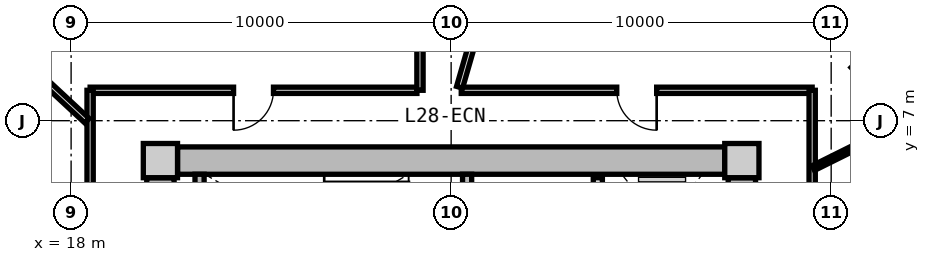
"""IFC4 building model, lengths in metres.
Left out: names, types, materials, properties, quantities, classifications, styles, units other than length and angle.
Written with IfcOpenShell. Run it as: python <this file> out.ifc"""

import sys

from ifc_helpers import new_model, si_unit, direction, frame, frame_2d, origin, origin_2d, place, context, subcontext, project, spatial, rectangle, extrude, source, transform, mapped, element, fill, save


model = new_model("IFC4")
c1 = context("Model", 3, precision=1e-05, world=origin(), true_north=direction((0.0, 1.0)))
c2 = subcontext(c1, "Body", "Model", "MODEL_VIEW")
j1 = project(units=[si_unit("LENGTHUNIT", "METRE"), si_unit("PLANEANGLEUNIT", "RADIAN")], contexts=[c1])
p1 = place(None, origin())
s1 = spatial("IfcSite", under=j1, at=p1, CompositionType="ELEMENT")
p2 = place(p1, origin())
s2 = spatial("IfcBuilding", under=s1, at=p2, CompositionType="ELEMENT")
p3 = place(p2, frame((0.0, 0.0, 93.2)))
s3 = spatial("IfcBuildingStorey", under=s2, at=p3, CompositionType="ELEMENT", Elevation=93.2)
m1 = source(origin(), c2, "Body", "SweptSolid", [
    extrude(rectangle(XDim=0.9, YDim=0.9, at=origin_2d()), origin(), (0.0, 0.0, 1.0), 3.05),
])
for number, where, z_axis, x_axis in (
    (1, (35.65, 5.95, 0.0), (0.0, 0.0, 1.0), (1.0, 0.0, 0.0)),
    (2, (20.35, 5.95, 0.0), (0.0, 0.0, 1.0), (1.0, 0.0, 0.0)),
):
    element("IfcColumn", number, at=place(p3, frame(where, z_axis=z_axis, x_axis=x_axis)), inside=s3, PredefinedType="COLUMN", context=c2, shape_type="MappedRepresentation", body=[
        mapped(m1, transform((0.0, 0.0, 0.0), x_axis=(1.0, 0.0, 0.0), y_axis=(0.0, 1.0, 0.0), z_axis=(0.0, 0.0, 1.0), scale=1.0)),
    ])
m2 = source(origin(), c2, "Body", "SweptSolid", [
    extrude(rectangle(XDim=14.4, YDim=0.72, at=frame_2d((7.2, 0.0))), origin(), (0.0, 0.0, 1.0), 2.79),
])
p4 = place(p3, frame((20.8, 5.95, 0.0), z_axis=(0.0, 0.0, 1.0), x_axis=(1.0, 0.0, 0.0)))
e3 = element("IfcWall", 3, at=p4, inside=s3, PredefinedType="SHEAR", context=c2, shape_type="MappedRepresentation", body=[
    mapped(m2, transform((0.0, 0.0, 0.0), x_axis=(1.0, 0.0, 0.0), y_axis=(0.0, 1.0, 0.0), z_axis=(0.0, 0.0, 1.0), scale=1.0)),
])
m3 = source(origin(), c2, "Body", "SweptSolid", [
    extrude(rectangle(XDim=11.0, YDim=0.72, at=frame_2d((5.5, 0.0))), origin(), (0.0, 0.0, 1.0), 2.79),
])
p5 = place(p3, frame((20.35, -5.5, 0.0), z_axis=(0.0, 0.0, 1.0), x_axis=(0.0, 1.0, 0.0)))
e4 = element("IfcWall", 4, at=p5, inside=s3, PredefinedType="SHEAR", context=c2, shape_type="MappedRepresentation", body=[
    mapped(m3, transform((0.0, 0.0, 0.0), x_axis=(1.0, 0.0, 0.0), y_axis=(0.0, 1.0, 0.0), z_axis=(0.0, 0.0, 1.0), scale=1.0)),
])
p6 = place(p5, frame((3.8, 0.0, 0.0)))
e5 = element("IfcOpeningElement", 5, at=p6, cuts=e4, PredefinedType="OPENING", context=c2, shape_type="SweptSolid", body=[
    extrude(rectangle(XDim=1.2, YDim=2.15, at=frame_2d((0.6, 1.075))), frame((0.0, 0.37, 0.0), z_axis=(0.0, -1.0, 0.0), x_axis=(1.0, 0.0, 0.0)), (0.0, 0.0, 1.0), 0.74),
])
p7 = place(p3, frame((35.65, 5.5, 0.0), z_axis=(0.0, 0.0, 1.0), x_axis=(0.0, -1.0, 0.0)))
e6 = element("IfcWall", 6, at=p7, inside=s3, PredefinedType="SHEAR", context=c2, shape_type="MappedRepresentation", body=[
    mapped(m3, transform((0.0, 0.0, 0.0), x_axis=(1.0, 0.0, 0.0), y_axis=(0.0, 1.0, 0.0), z_axis=(0.0, 0.0, 1.0), scale=1.0)),
])
p8 = place(p7, frame((5.65, 0.0, 0.0)))
e7 = element("IfcOpeningElement", 7, at=p8, cuts=e6, PredefinedType="OPENING", context=c2, shape_type="SweptSolid", body=[
    extrude(rectangle(XDim=1.2, YDim=2.15, at=frame_2d((0.6, 1.075))), frame((0.0, 0.37, 0.0), z_axis=(0.0, -1.0, 0.0), x_axis=(1.0, 0.0, 0.0)), (0.0, 0.0, 1.0), 0.74),
])
p9 = place(p7, frame((9.3, 0.0, 0.0)))
e8 = element("IfcOpeningElement", 8, at=p9, cuts=e6, PredefinedType="OPENING", context=c2, shape_type="SweptSolid", body=[
    extrude(rectangle(XDim=1.0, YDim=2.1, at=frame_2d((0.5, 1.05))), frame((0.0, 0.37, 0.0), z_axis=(0.0, -1.0, 0.0), x_axis=(1.0, 0.0, 0.0)), (0.0, 0.0, 1.0), 0.74),
])
m4 = source(origin(), c2, "Body", "SweptSolid", [
    extrude(rectangle(XDim=3.14, YDim=0.24, at=frame_2d((1.57, 0.0))), origin(), (0.0, 0.0, 1.0), 2.79),
])
p10 = place(p3, frame((21.38, 2.45, 0.0), z_axis=(0.0, 0.0, 1.0), x_axis=(0.0, 1.0, 0.0)))
e9 = element("IfcWall", 9, at=p10, inside=s3, PredefinedType="PARTITIONING", context=c2, shape_type="MappedRepresentation", body=[
    mapped(m4, transform((0.0, 0.0, 0.0), x_axis=(1.0, 0.0, 0.0), y_axis=(0.0, 1.0, 0.0), z_axis=(0.0, 0.0, 1.0), scale=1.0)),
])
p11 = place(p3, frame((28.42, 2.45, 0.0), z_axis=(0.0, 0.0, 1.0), x_axis=(0.0, 1.0, 0.0)))
e10 = element("IfcWall", 10, at=p11, inside=s3, PredefinedType="PARTITIONING", context=c2, shape_type="MappedRepresentation", body=[
    mapped(m4, transform((0.0, 0.0, 0.0), x_axis=(1.0, 0.0, 0.0), y_axis=(0.0, 1.0, 0.0), z_axis=(0.0, 0.0, 1.0), scale=1.0)),
])
p12 = place(p11, frame((0.55, 0.0, 0.0)))
e11 = element("IfcOpeningElement", 11, at=p12, cuts=e10, PredefinedType="OPENING", context=c2, shape_type="SweptSolid", body=[
    extrude(rectangle(XDim=1.1, YDim=2.15, at=frame_2d((0.55, 1.075))), frame((0.0, 0.13, 0.0), z_axis=(0.0, -1.0, 0.0), x_axis=(1.0, 0.0, 0.0)), (0.0, 0.0, 1.0), 0.26),
])
m5 = source(origin(), c2, "Body", "SweptSolid", [
    extrude(rectangle(XDim=5.0, YDim=0.24, at=frame_2d((2.5, 0.0))), origin(), (0.0, 0.0, 1.0), 2.775),
])
p13 = place(p3, frame((31.86, 0.5, 0.0), z_axis=(0.0, 0.0, 1.0), x_axis=(0.0, 1.0, 0.0)))
e12 = element("IfcWall", 12, at=p13, inside=s3, PredefinedType="PARTITIONING", context=c2, shape_type="MappedRepresentation", body=[
    mapped(m5, transform((0.0, 0.0, 0.0), x_axis=(1.0, 0.0, 0.0), y_axis=(0.0, 1.0, 0.0), z_axis=(0.0, 0.0, 1.0), scale=1.0)),
])
p14 = place(p13, frame((3.05, 0.0, 0.0)))
e13 = element("IfcOpeningElement", 13, at=p14, cuts=e12, PredefinedType="OPENING", context=c2, shape_type="SweptSolid", body=[
    extrude(rectangle(XDim=1.3, YDim=2.2, at=frame_2d((0.65, 1.1))), frame((0.0, 0.13, 0.0), z_axis=(0.0, -1.0, 0.0), x_axis=(1.0, 0.0, 0.0)), (0.0, 0.0, 1.0), 0.26),
])
p15 = place(p13, frame((0.55, 0.0, 0.0)))
e14 = element("IfcOpeningElement", 14, at=p15, cuts=e12, PredefinedType="OPENING", context=c2, shape_type="SweptSolid", body=[
    extrude(rectangle(XDim=1.3, YDim=2.2, at=frame_2d((0.65, 1.1))), frame((0.0, 0.13, 0.0), z_axis=(0.0, -1.0, 0.0), x_axis=(1.0, 0.0, 0.0)), (0.0, 0.0, 1.0), 0.26),
])
m6 = source(origin(), c2, "Body", "SweptSolid", [
    extrude(rectangle(XDim=8.6, YDim=0.165, at=frame_2d((4.3, 0.0))), origin(), (0.0, 0.0, 1.0), 2.775),
])
p16 = place(p3, frame((18.5, 7.8, 0.0), z_axis=(0.0, 0.0, 1.0), x_axis=(1.0, 0.0, 0.0)))
e15 = element("IfcWall", 15, at=p16, inside=s3, PredefinedType="PARTITIONING", context=c2, shape_type="MappedRepresentation", body=[
    mapped(m6, transform((0.0, 0.0, 0.0), x_axis=(1.0, 0.0, 0.0), y_axis=(0.0, 1.0, 0.0), z_axis=(0.0, 0.0, 1.0), scale=1.0)),
])
p17 = place(p16, frame((3.775, 0.0, 0.0)))
e16 = element("IfcOpeningElement", 16, at=p17, cuts=e15, PredefinedType="OPENING", context=c2, shape_type="SweptSolid", body=[
    extrude(rectangle(XDim=1.05, YDim=2.15, at=frame_2d((0.525, 1.075))), frame((0.0, 0.093, 0.0), z_axis=(0.0, -1.0, 0.0), x_axis=(1.0, 0.0, 0.0)), (0.0, 0.0, 1.0), 0.185),
])
m7 = source(origin(), c2, "Body", "SweptSolid", [
    extrude(rectangle(XDim=9.234, YDim=0.165, at=frame_2d((4.617, 0.0))), origin(), (0.0, 0.0, 1.0), 2.775),
])
p18 = place(p3, frame((28.266, 7.8, 0.0), z_axis=(0.0, 0.0, 1.0), x_axis=(1.0, 0.0, 0.0)))
e17 = element("IfcWall", 17, at=p18, inside=s3, PredefinedType="PARTITIONING", context=c2, shape_type="MappedRepresentation", body=[
    mapped(m7, transform((0.0, 0.0, 0.0), x_axis=(1.0, 0.0, 0.0), y_axis=(0.0, 1.0, 0.0), z_axis=(0.0, 0.0, 1.0), scale=1.0)),
])
p19 = place(p18, frame((4.092, 0.0, 0.0)))
e18 = element("IfcOpeningElement", 18, at=p19, cuts=e17, PredefinedType="OPENING", context=c2, shape_type="SweptSolid", body=[
    extrude(rectangle(XDim=1.05, YDim=2.15, at=frame_2d((0.525, 1.075))), frame((0.0, 0.093, 0.0), z_axis=(0.0, -1.0, 0.0), x_axis=(1.0, 0.0, 0.0)), (0.0, 0.0, 1.0), 0.185),
])
m8 = source(origin(), c2, "Body", "SweptSolid", [
    extrude(rectangle(XDim=15.6, YDim=0.165, at=frame_2d((7.8, 0.0))), origin(), (0.0, 0.0, 1.0), 2.775),
])
p20 = place(p3, frame((18.5, -7.8, 0.0), z_axis=(0.0, 0.0, 1.0), x_axis=(0.0, 1.0, 0.0)))
e19 = element("IfcWall", 19, at=p20, inside=s3, PredefinedType="PARTITIONING", context=c2, shape_type="MappedRepresentation", body=[
    mapped(m8, transform((0.0, 0.0, 0.0), x_axis=(1.0, 0.0, 0.0), y_axis=(0.0, 1.0, 0.0), z_axis=(0.0, 0.0, 1.0), scale=1.0)),
])
p21 = place(p20, frame((5.673, 0.0, 0.0)))
e20 = element("IfcOpeningElement", 20, at=p21, cuts=e19, PredefinedType="OPENING", context=c2, shape_type="SweptSolid", body=[
    extrude(rectangle(XDim=1.05, YDim=2.15, at=frame_2d((0.525, 1.075))), frame((0.0, 0.093, 0.0), z_axis=(0.0, -1.0, 0.0), x_axis=(1.0, 0.0, 0.0)), (0.0, 0.0, 1.0), 0.185),
])
p22 = place(p3, frame((37.5, 7.8, 0.0), z_axis=(0.0, 0.0, 1.0), x_axis=(0.0, -1.0, 0.0)))
e21 = element("IfcWall", 21, at=p22, inside=s3, PredefinedType="PARTITIONING", context=c2, shape_type="MappedRepresentation", body=[
    mapped(m8, transform((0.0, 0.0, 0.0), x_axis=(1.0, 0.0, 0.0), y_axis=(0.0, 1.0, 0.0), z_axis=(0.0, 0.0, 1.0), scale=1.0)),
])
p23 = place(p22, frame((9.482, 0.0, 0.0)))
e22 = element("IfcOpeningElement", 22, at=p23, cuts=e21, PredefinedType="OPENING", context=c2, shape_type="SweptSolid", body=[
    extrude(rectangle(XDim=1.25, YDim=2.2, at=frame_2d((0.625, 1.1))), frame((0.0, 0.093, 0.0), z_axis=(0.0, -1.0, 0.0), x_axis=(1.0, 0.0, 0.0)), (0.0, 0.0, 1.0), 0.185),
])
m9 = source(origin(), c2, "Body", "SweptSolid", [
    extrude(rectangle(XDim=8.989, YDim=0.165, at=frame_2d((4.495, 0.0))), origin(), (0.0, 0.0, 1.0), 2.275),
])
p24 = place(p3, frame((28.222, 7.88, 0.0), z_axis=(0.0, 0.0, 1.0), x_axis=(0.27702323008, 0.960863221274, 0.0)))
e23 = element("IfcWall", 23, at=p24, inside=s3, PredefinedType="PARTITIONING", context=c2, shape_type="MappedRepresentation", body=[
    mapped(m9, transform((0.0, 0.0, 0.0), x_axis=(1.0, 0.0, 0.0), y_axis=(0.0, 1.0, 0.0), z_axis=(0.0, 0.0, 1.0), scale=1.0)),
])
m10 = source(origin(), c2, "Body", "SweptSolid", [
    extrude(rectangle(XDim=7.482, YDim=0.165, at=frame_2d((3.741, 0.0))), origin(), (0.0, 0.0, 1.0), 2.275),
])
p25 = place(p3, frame((18.42, 6.998, 0.0), z_axis=(0.0, 0.0, 1.0), x_axis=(-0.732508698043, 0.680757671489, 0.0)))
e24 = element("IfcWall", 24, at=p25, inside=s3, PredefinedType="PARTITIONING", context=c2, shape_type="MappedRepresentation", body=[
    mapped(m10, transform((0.0, 0.0, 0.0), x_axis=(1.0, 0.0, 0.0), y_axis=(0.0, 1.0, 0.0), z_axis=(0.0, 0.0, 1.0), scale=1.0)),
])
m11 = source(origin(), c2, "Body", "SweptSolid", [
    extrude(rectangle(XDim=7.56, YDim=0.165, at=frame_2d((3.78, 0.0))), origin(), (0.0, 0.0, 1.0), 2.775),
])
p26 = place(p3, frame((27.18, 7.8, 0.0), z_axis=(0.0, 0.0, 1.0), x_axis=(0.0, 1.0, 0.0)))
e25 = element("IfcWall", 25, at=p26, inside=s3, PredefinedType="PARTITIONING", context=c2, shape_type="MappedRepresentation", body=[
    mapped(m11, transform((0.0, 0.0, 0.0), x_axis=(1.0, 0.0, 0.0), y_axis=(0.0, 1.0, 0.0), z_axis=(0.0, 0.0, 1.0), scale=1.0)),
])
m12 = source(origin(), c2, "Body", "SweptSolid", [
    extrude(rectangle(XDim=3.069, YDim=0.14, at=frame_2d((1.535, 0.0))), origin(), (0.0, 0.0, 1.0), 2.775),
])
p27 = place(p3, frame((18.47, 4.368, 0.0), z_axis=(0.0, 0.0, 1.0), x_axis=(-0.863524911282, 0.504306184371, 0.0)))
e26 = element("IfcWall", 26, at=p27, inside=s3, PredefinedType="PARTITIONING", context=c2, shape_type="MappedRepresentation", body=[
    mapped(m12, transform((0.0, 0.0, 0.0), x_axis=(1.0, 0.0, 0.0), y_axis=(0.0, 1.0, 0.0), z_axis=(0.0, 0.0, 1.0), scale=1.0)),
])
m13 = source(origin(), c2, "Body", "SweptSolid", [
    extrude(rectangle(XDim=1.6, YDim=0.14, at=frame_2d((0.8, 0.0))), origin(), (0.0, 0.0, 1.0), 2.775),
])
p28 = place(p3, frame((37.53, 5.754, 0.0), z_axis=(0.0, 0.0, 1.0), x_axis=(0.895522919837, 0.445015393044, 0.0)))
e27 = element("IfcWall", 27, at=p28, inside=s3, PredefinedType="PARTITIONING", context=c2, shape_type="MappedRepresentation", body=[
    mapped(m13, transform((0.0, 0.0, 0.0), x_axis=(1.0, 0.0, 0.0), y_axis=(0.0, 1.0, 0.0), z_axis=(0.0, 0.0, 1.0), scale=1.0)),
])
m14 = source(origin(), c2, "Body", "SweptSolid", [
    extrude(rectangle(XDim=3.943, YDim=0.115, at=frame_2d((1.972, 0.0))), origin(), (0.0, 0.0, 1.0), 2.775),
])
p29 = place(p3, frame((39.611, 7.37, 0.0), z_axis=(0.0, 0.0, 1.0), x_axis=(-0.699481885754, 0.714650328134, 0.0)))
e28 = element("IfcWall", 28, at=p29, inside=s3, PredefinedType="PARTITIONING", context=c2, shape_type="MappedRepresentation", body=[
    mapped(m14, transform((0.0, 0.0, 0.0), x_axis=(1.0, 0.0, 0.0), y_axis=(0.0, 1.0, 0.0), z_axis=(0.0, 0.0, 1.0), scale=1.0)),
])
p30 = place(p29, frame((1.497, 0.0, 0.0)))
e29 = element("IfcOpeningElement", 29, at=p30, cuts=e28, PredefinedType="OPENING", context=c2, shape_type="SweptSolid", body=[
    extrude(rectangle(XDim=0.95, YDim=2.1, at=frame_2d((0.475, 1.05))), frame((0.0, 0.067, 0.0), z_axis=(0.0, -1.0, 0.0), x_axis=(1.0, 0.0, 0.0)), (0.0, 0.0, 1.0), 0.135),
])
m15 = source(origin(), c2, "Body", "SweptSolid", [
    extrude(rectangle(XDim=1.05, YDim=2.15, at=frame_2d((0.525, 1.075))), frame((0.0, 0.025, 0.0), z_axis=(0.0, -1.0, 0.0), x_axis=(1.0, 0.0, 0.0)), (0.0, 0.0, 1.0), 0.05),
])
p31 = place(p17, frame((1.05, 0.0, 0.0), z_axis=(0.0, 0.0, 1.0), x_axis=(-1.0, 0.0, 0.0)))
e30 = element("IfcDoor", 30, at=p31, inside=s3, OperationType="SINGLE_SWING_RIGHT", PredefinedType="DOOR", context=c2, shape_type="MappedRepresentation", body=[
    mapped(m15, transform((0.0, 0.0, 0.0), x_axis=(1.0, 0.0, 0.0), y_axis=(0.0, 1.0, 0.0), z_axis=(0.0, 0.0, 1.0), scale=1.0)),
])
fill(e16, e30)
p32 = place(p19, frame((1.05, 0.0, 0.0), z_axis=(0.0, 0.0, 1.0), x_axis=(-1.0, 0.0, 0.0)))
e31 = element("IfcDoor", 31, at=p32, inside=s3, OperationType="SINGLE_SWING_LEFT", PredefinedType="DOOR", context=c2, shape_type="MappedRepresentation", body=[
    mapped(m15, transform((0.0, 0.0, 0.0), x_axis=(1.0, 0.0, 0.0), y_axis=(0.0, 1.0, 0.0), z_axis=(0.0, 0.0, 1.0), scale=1.0)),
])
fill(e18, e31)
m16 = source(origin(), c2, "Body", "SweptSolid", [
    extrude(rectangle(XDim=0.95, YDim=2.1, at=frame_2d((0.475, 1.05))), frame((0.0, 0.025, 0.0), z_axis=(0.0, -1.0, 0.0), x_axis=(1.0, 0.0, 0.0)), (0.0, 0.0, 1.0), 0.05),
])
p33 = place(p30, frame((0.95, 0.0, 0.0), z_axis=(0.0, 0.0, 1.0), x_axis=(-1.0, 0.0, 0.0)))
e32 = element("IfcDoor", 32, at=p33, inside=s3, OperationType="SINGLE_SWING_LEFT", PredefinedType="DOOR", context=c2, shape_type="MappedRepresentation", body=[
    mapped(m16, transform((0.0, 0.0, 0.0), x_axis=(1.0, 0.0, 0.0), y_axis=(0.0, 1.0, 0.0), z_axis=(0.0, 0.0, 1.0), scale=1.0)),
])
fill(e29, e32)
save(model, sys.argv[1])
